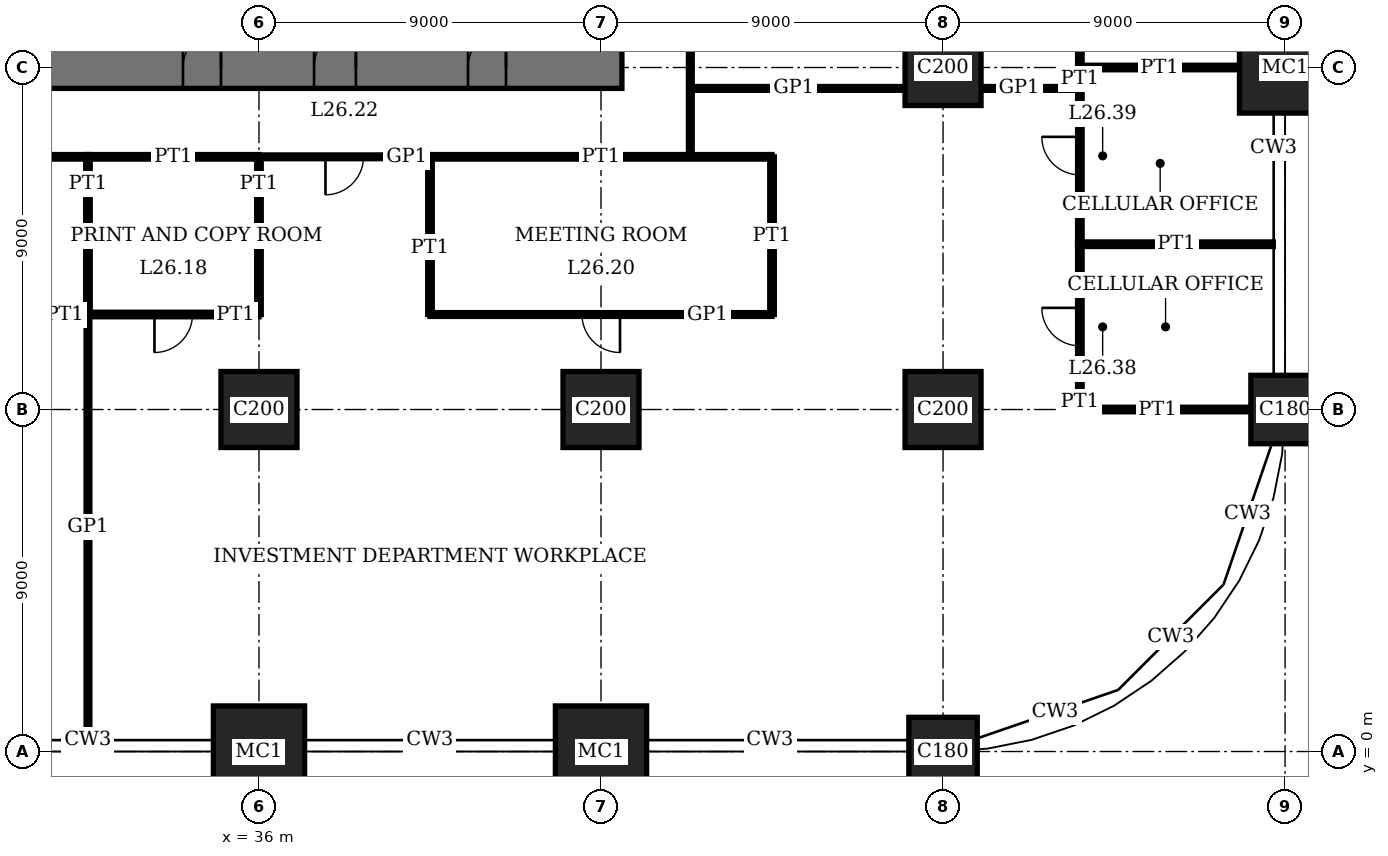
"""IFC4 building model, lengths in metres.
Left out: names, types, materials, properties, quantities, classifications, styles, units other than length and angle.
Written with IfcOpenShell. Run it as: python <this file> out.ifc"""

import sys

from ifc_helpers import new_model, si_unit, direction, frame, frame_2d, origin, origin_2d, place, context, subcontext, project, spatial, rectangle, extrude, element, fill, save


model = new_model("IFC4")
c1 = context("Model", 3, precision=1e-05, world=origin(), true_north=direction((0.0, 1.0)))
c2 = subcontext(c1, "Body", "Model", "MODEL_VIEW")
j1 = project(units=[si_unit("LENGTHUNIT", "METRE"), si_unit("PLANEANGLEUNIT", "RADIAN")], contexts=[c1])
p1 = place(None, origin())
s1 = spatial("IfcSite", under=j1, at=p1, CompositionType="ELEMENT")
p2 = place(p1, origin())
s2 = spatial("IfcBuilding", under=s1, at=p2, CompositionType="ELEMENT")
p3 = place(p2, frame((0.0, 0.0, 109.0)))
s3 = spatial("IfcBuildingStorey", under=s2, at=p3, CompositionType="ELEMENT", Elevation=109.0)
p4 = place(p3, frame((36.0, 0.0, 0.0), z_axis=(0.0, 0.0, 1.0), x_axis=(1.0, 0.0, 0.0)))
e1 = element("IfcColumn", 1, at=p4, inside=s3, PredefinedType="COLUMN", context=c2, shape_type="SweptSolid", body=[
    extrude(rectangle(XDim=2.4, YDim=2.4, at=origin_2d()), origin(), (0.0, 0.0, 1.0), 4.0),
])
p5 = place(p3, frame((36.0, 9.0, 0.0), z_axis=(0.0, 0.0, 1.0), x_axis=(1.0, 0.0, 0.0)))
e2 = element("IfcColumn", 2, at=p5, inside=s3, PredefinedType="COLUMN", context=c2, shape_type="SweptSolid", body=[
    extrude(rectangle(XDim=2.0, YDim=2.0, at=origin_2d()), origin(), (0.0, 0.0, 1.0), 4.0),
])
p6 = place(p3, frame((45.0, 0.0, 0.0), z_axis=(0.0, 0.0, 1.0), x_axis=(1.0, 0.0, 0.0)))
e3 = element("IfcColumn", 3, at=p6, inside=s3, PredefinedType="COLUMN", context=c2, shape_type="SweptSolid", body=[
    extrude(rectangle(XDim=2.4, YDim=2.4, at=origin_2d()), origin(), (0.0, 0.0, 1.0), 4.0),
])
p7 = place(p3, frame((45.0, 9.0, 0.0), z_axis=(0.0, 0.0, 1.0), x_axis=(1.0, 0.0, 0.0)))
e4 = element("IfcColumn", 4, at=p7, inside=s3, PredefinedType="COLUMN", context=c2, shape_type="SweptSolid", body=[
    extrude(rectangle(XDim=2.0, YDim=2.0, at=origin_2d()), origin(), (0.0, 0.0, 1.0), 4.0),
])
p8 = place(p3, frame((54.0, 0.0, 0.0), z_axis=(0.0, 0.0, 1.0), x_axis=(1.0, 0.0, 0.0)))
e5 = element("IfcColumn", 5, at=p8, inside=s3, PredefinedType="COLUMN", context=c2, shape_type="SweptSolid", body=[
    extrude(rectangle(XDim=1.8, YDim=1.8, at=origin_2d()), origin(), (0.0, 0.0, 1.0), 4.0),
])
for number, where, z_axis, x_axis in (
    (6, (54.0, 9.0, 0.0), (0.0, 0.0, 1.0), (1.0, 0.0, 0.0)),
    (7, (54.0, 18.0, 0.0), (0.0, 0.0, 1.0), (1.0, 0.0, 0.0)),
):
    element("IfcColumn", number, at=place(p3, frame(where, z_axis=z_axis, x_axis=x_axis)), inside=s3, PredefinedType="COLUMN", context=c2, shape_type="SweptSolid", body=[
        extrude(rectangle(XDim=2.0, YDim=2.0, at=origin_2d()), origin(), (0.0, 0.0, 1.0), 4.0),
    ])
p9 = place(p3, frame((63.0, 9.0, 0.0), z_axis=(0.0, 0.0, 1.0), x_axis=(1.0, 0.0, 0.0)))
e8 = element("IfcColumn", 8, at=p9, inside=s3, PredefinedType="COLUMN", context=c2, shape_type="SweptSolid", body=[
    extrude(rectangle(XDim=1.8, YDim=1.8, at=origin_2d()), origin(), (0.0, 0.0, 1.0), 4.0),
])
p10 = place(p3, frame((63.0, 18.0, 0.0), z_axis=(0.0, 0.0, 1.0), x_axis=(1.0, 0.0, 0.0)))
e9 = element("IfcColumn", 9, at=p10, inside=s3, PredefinedType="COLUMN", context=c2, shape_type="SweptSolid", body=[
    extrude(rectangle(XDim=2.4, YDim=2.4, at=origin_2d()), origin(), (0.0, 0.0, 1.0), 4.0),
])
p11 = place(p3, frame((17.45, 18.0, 0.0), z_axis=(0.0, 0.0, 1.0), x_axis=(1.0, 0.0, 0.0)))
e10 = element("IfcWall", 10, at=p11, inside=s3, PredefinedType="SHEAR", context=c2, shape_type="SweptSolid", body=[
    extrude(rectangle(XDim=28.1, YDim=1.1, at=frame_2d((14.05, 0.0))), origin(), (0.0, 0.0, 1.0), 4.0),
])
p12 = place(p11, frame((11.55, 0.0, 0.0)))
e11 = element("IfcOpeningElement", 11, at=p12, cuts=e10, PredefinedType="OPENING", context=c2, shape_type="SweptSolid", body=[
    extrude(rectangle(XDim=1.0, YDim=2.4, at=frame_2d((0.5, 1.2))), frame((0.0, 0.56, 0.0), z_axis=(0.0, -1.0, 0.0), x_axis=(1.0, 0.0, 0.0)), (0.0, 0.0, 1.0), 1.12),
])
p13 = place(p11, frame((16.55, 0.0, 0.0)))
e12 = element("IfcOpeningElement", 12, at=p13, cuts=e10, PredefinedType="OPENING", context=c2, shape_type="SweptSolid", body=[
    extrude(rectangle(XDim=1.0, YDim=2.4, at=frame_2d((0.5, 1.2))), frame((0.0, 0.56, 0.0), z_axis=(0.0, -1.0, 0.0), x_axis=(1.0, 0.0, 0.0)), (0.0, 0.0, 1.0), 1.12),
])
p14 = place(p11, frame((20.0, 0.0, 0.0)))
e13 = element("IfcOpeningElement", 13, at=p14, cuts=e10, PredefinedType="OPENING", context=c2, shape_type="SweptSolid", body=[
    extrude(rectangle(XDim=1.1, YDim=2.4, at=frame_2d((0.55, 1.2))), frame((0.0, 0.56, 0.0), z_axis=(0.0, -1.0, 0.0), x_axis=(1.0, 0.0, 0.0)), (0.0, 0.0, 1.0), 1.12),
])
p15 = place(p11, frame((24.05, 0.0, 0.0)))
e14 = element("IfcOpeningElement", 14, at=p15, cuts=e10, PredefinedType="OPENING", context=c2, shape_type="SweptSolid", body=[
    extrude(rectangle(XDim=1.0, YDim=2.4, at=frame_2d((0.5, 1.2))), frame((0.0, 0.56, 0.0), z_axis=(0.0, -1.0, 0.0), x_axis=(1.0, 0.0, 0.0)), (0.0, 0.0, 1.0), 1.12),
])
p16 = place(p3, frame((57.6, 9.0, 0.0), z_axis=(0.0, 0.0, 1.0), x_axis=(1.0, 0.0, 0.0)))
e15 = element("IfcWall", 15, at=p16, inside=s3, PredefinedType="PARTITIONING", context=c2, shape_type="SweptSolid", body=[
    extrude(rectangle(XDim=4.5, YDim=0.12, at=frame_2d((2.25, 0.0))), origin(), (0.0, 0.0, 1.0), 3.05),
])
p17 = place(p3, frame((27.0, 11.5, 0.0), z_axis=(0.0, 0.0, 1.0), x_axis=(1.0, 0.0, 0.0)))
e16 = element("IfcWall", 16, at=p17, inside=s3, PredefinedType="PARTITIONING", context=c2, shape_type="SweptSolid", body=[
    extrude(rectangle(XDim=4.5, YDim=0.12, at=frame_2d((2.25, 0.0))), origin(), (0.0, 0.0, 1.0), 3.75),
])
p18 = place(p17, frame((1.75, 0.0, 0.0)))
e17 = element("IfcOpeningElement", 17, at=p18, cuts=e16, PredefinedType="OPENING", context=c2, shape_type="SweptSolid", body=[
    extrude(rectangle(XDim=1.0, YDim=2.4, at=frame_2d((0.5, 1.2))), frame((0.0, 0.07, 0.0), z_axis=(0.0, -1.0, 0.0), x_axis=(1.0, 0.0, 0.0)), (0.0, 0.0, 1.0), 0.14),
])
p19 = place(p3, frame((31.5, 11.5, 0.0), z_axis=(0.0, 0.0, 1.0), x_axis=(1.0, 0.0, 0.0)))
e18 = element("IfcWall", 18, at=p19, inside=s3, PredefinedType="PARTITIONING", context=c2, shape_type="SweptSolid", body=[
    extrude(rectangle(XDim=4.5, YDim=0.12, at=frame_2d((2.25, 0.0))), origin(), (0.0, 0.0, 1.0), 3.75),
])
p20 = place(p19, frame((1.75, 0.0, 0.0)))
e19 = element("IfcOpeningElement", 19, at=p20, cuts=e18, PredefinedType="OPENING", context=c2, shape_type="SweptSolid", body=[
    extrude(rectangle(XDim=1.0, YDim=2.4, at=frame_2d((0.5, 1.2))), frame((0.0, 0.07, 0.0), z_axis=(0.0, -1.0, 0.0), x_axis=(1.0, 0.0, 0.0)), (0.0, 0.0, 1.0), 0.14),
])
p21 = place(p3, frame((40.5, 11.5, 0.0), z_axis=(0.0, 0.0, 1.0), x_axis=(1.0, 0.0, 0.0)))
e20 = element("IfcWall", 20, at=p21, inside=s3, PredefinedType="PARTITIONING", context=c2, shape_type="SweptSolid", body=[
    extrude(rectangle(XDim=9.0, YDim=0.1, at=frame_2d((4.5, 0.0))), origin(), (0.0, 0.0, 1.0), 3.75),
])
p22 = place(p21, frame((4.0, 0.0, 0.0)))
e21 = element("IfcOpeningElement", 21, at=p22, cuts=e20, PredefinedType="OPENING", context=c2, shape_type="SweptSolid", body=[
    extrude(rectangle(XDim=1.0, YDim=2.4, at=frame_2d((0.5, 1.2))), frame((0.0, 0.06, 0.0), z_axis=(0.0, -1.0, 0.0), x_axis=(1.0, 0.0, 0.0)), (0.0, 0.0, 1.0), 0.12),
])
p23 = place(p3, frame((57.6, 13.35, 0.0), z_axis=(0.0, 0.0, 1.0), x_axis=(1.0, 0.0, 0.0)))
e22 = element("IfcWall", 22, at=p23, inside=s3, PredefinedType="PARTITIONING", context=c2, shape_type="SweptSolid", body=[
    extrude(rectangle(XDim=5.09, YDim=0.12, at=frame_2d((2.545, 0.0))), origin(), (0.0, 0.0, 1.0), 3.1),
])
p24 = place(p3, frame((40.5, 15.65, 0.0), z_axis=(0.0, 0.0, 1.0), x_axis=(1.0, 0.0, 0.0)))
e23 = element("IfcWall", 23, at=p24, inside=s3, PredefinedType="PARTITIONING", context=c2, shape_type="SweptSolid", body=[
    extrude(rectangle(XDim=9.0, YDim=0.12, at=frame_2d((4.5, 0.0))), origin(), (0.0, 0.0, 1.0), 3.75),
])
for number, where, z_axis, x_axis in (
    (24, (27.0, 15.65, 0.0), (0.0, 0.0, 1.0), (1.0, 0.0, 0.0)),
    (25, (31.5, 15.65, 0.0), (0.0, 0.0, 1.0), (1.0, 0.0, 0.0)),
):
    element("IfcWall", number, at=place(p3, frame(where, z_axis=z_axis, x_axis=x_axis)), inside=s3, PredefinedType="PARTITIONING", context=c2, shape_type="SweptSolid", body=[
        extrude(rectangle(XDim=4.5, YDim=0.12, at=frame_2d((2.25, 0.0))), origin(), (0.0, 0.0, 1.0), 3.75),
    ])
p25 = place(p3, frame((36.0, 15.65, 0.0), z_axis=(0.0, 0.0, 1.0), x_axis=(1.0, 0.0, 0.0)))
e26 = element("IfcWall", 26, at=p25, inside=s3, PredefinedType="PARTITIONING", context=c2, shape_type="SweptSolid", body=[
    extrude(rectangle(XDim=4.5, YDim=0.1, at=frame_2d((2.25, 0.0))), origin(), (0.0, 0.0, 1.0), 3.75),
])
p26 = place(p25, frame((1.75, 0.0, 0.0)))
e27 = element("IfcOpeningElement", 27, at=p26, cuts=e26, PredefinedType="OPENING", context=c2, shape_type="SweptSolid", body=[
    extrude(rectangle(XDim=1.0, YDim=2.4, at=frame_2d((0.5, 1.2))), frame((0.0, 0.06, 0.0), z_axis=(0.0, -1.0, 0.0), x_axis=(1.0, 0.0, 0.0)), (0.0, 0.0, 1.0), 0.12),
])
p27 = place(p3, frame((47.35, 17.45, 0.0), z_axis=(0.0, 0.0, 1.0), x_axis=(1.0, 0.0, 0.0)))
e28 = element("IfcWall", 28, at=p27, inside=s3, PredefinedType="PARTITIONING", context=c2, shape_type="SweptSolid", body=[
    extrude(rectangle(XDim=5.65, YDim=0.1, at=frame_2d((2.825, 0.0))), origin(), (0.0, 0.0, 1.0), 3.75),
])
p28 = place(p3, frame((55.0, 17.45, 0.0), z_axis=(0.0, 0.0, 1.0), x_axis=(1.0, 0.0, 0.0)))
e29 = element("IfcWall", 29, at=p28, inside=s3, PredefinedType="PARTITIONING", context=c2, shape_type="SweptSolid", body=[
    extrude(rectangle(XDim=2.61, YDim=0.1, at=frame_2d((1.305, 0.0))), origin(), (0.0, 0.0, 1.0), 3.75),
])
p29 = place(p3, frame((57.6, 18.0, 0.0), z_axis=(0.0, 0.0, 1.0), x_axis=(1.0, 0.0, 0.0)))
e30 = element("IfcWall", 30, at=p29, inside=s3, PredefinedType="PARTITIONING", context=c2, shape_type="SweptSolid", body=[
    extrude(rectangle(XDim=4.2, YDim=0.12, at=frame_2d((2.1, 0.0))), origin(), (0.0, 0.0, 1.0), 3.05),
])
p30 = place(p3, frame((31.5, 11.5, 0.0), z_axis=(0.0, 0.0, 1.0), x_axis=(0.0, 1.0, 0.0)))
e31 = element("IfcWall", 31, at=p30, inside=s3, PredefinedType="PARTITIONING", context=c2, shape_type="SweptSolid", body=[
    extrude(rectangle(XDim=4.15, YDim=0.12, at=frame_2d((2.075, 0.0))), origin(), (0.0, 0.0, 1.0), 3.75),
])
p31 = place(p3, frame((31.5, 0.31, 0.0), z_axis=(0.0, 0.0, 1.0), x_axis=(0.0, 1.0, 0.0)))
e32 = element("IfcWall", 32, at=p31, inside=s3, PredefinedType="PARTITIONING", context=c2, shape_type="SweptSolid", body=[
    extrude(rectangle(XDim=11.19, YDim=0.1, at=frame_2d((5.595, 0.0))), origin(), (0.0, 0.0, 1.0), 3.75),
])
p32 = place(p3, frame((36.0, 11.5, 0.0), z_axis=(0.0, 0.0, 1.0), x_axis=(0.0, 1.0, 0.0)))
e33 = element("IfcWall", 33, at=p32, inside=s3, PredefinedType="PARTITIONING", context=c2, shape_type="SweptSolid", body=[
    extrude(rectangle(XDim=4.15, YDim=0.12, at=frame_2d((2.075, 0.0))), origin(), (0.0, 0.0, 1.0), 3.05),
])
p33 = place(p3, frame((40.5, 11.5, 0.0), z_axis=(0.0, 0.0, 1.0), x_axis=(0.0, 1.0, 0.0)))
e34 = element("IfcWall", 34, at=p33, inside=s3, PredefinedType="PARTITIONING", context=c2, shape_type="SweptSolid", body=[
    extrude(rectangle(XDim=4.15, YDim=0.12, at=frame_2d((2.075, 0.0))), origin(), (0.0, 0.0, 1.0), 3.75),
])
p34 = place(p3, frame((47.35, 15.65, 0.0), z_axis=(0.0, 0.0, 1.0), x_axis=(0.0, 1.0, 0.0)))
e35 = element("IfcWall", 35, at=p34, inside=s3, PredefinedType="PARTITIONING", context=c2, shape_type="SweptSolid", body=[
    extrude(rectangle(XDim=20.9, YDim=0.1, at=frame_2d((10.45, 0.0))), origin(), (0.0, 0.0, 1.0), 3.75),
])
p35 = place(p34, frame((9.95, 0.0, 0.0)))
e36 = element("IfcOpeningElement", 36, at=p35, cuts=e35, PredefinedType="OPENING", context=c2, shape_type="SweptSolid", body=[
    extrude(rectangle(XDim=1.0, YDim=2.4, at=frame_2d((0.5, 1.2))), frame((0.0, 0.06, 0.0), z_axis=(0.0, -1.0, 0.0), x_axis=(1.0, 0.0, 0.0)), (0.0, 0.0, 1.0), 0.12),
])
p36 = place(p3, frame((49.5, 11.5, 0.0), z_axis=(0.0, 0.0, 1.0), x_axis=(0.0, 1.0, 0.0)))
e37 = element("IfcWall", 37, at=p36, inside=s3, PredefinedType="PARTITIONING", context=c2, shape_type="SweptSolid", body=[
    extrude(rectangle(XDim=4.15, YDim=0.12, at=frame_2d((2.075, 0.0))), origin(), (0.0, 0.0, 1.0), 3.75),
])
p37 = place(p3, frame((57.6, 9.0, 0.0), z_axis=(0.0, 0.0, 1.0), x_axis=(0.0, 1.0, 0.0)))
e38 = element("IfcWall", 38, at=p37, inside=s3, PredefinedType="PARTITIONING", context=c2, shape_type="SweptSolid", body=[
    extrude(rectangle(XDim=4.35, YDim=0.12, at=frame_2d((2.175, 0.0))), origin(), (0.0, 0.0, 1.0), 3.75),
])
p38 = place(p37, frame((1.675, 0.0, 0.0)))
e39 = element("IfcOpeningElement", 39, at=p38, cuts=e38, PredefinedType="OPENING", context=c2, shape_type="SweptSolid", body=[
    extrude(rectangle(XDim=1.0, YDim=2.4, at=frame_2d((0.5, 1.2))), frame((0.0, 0.07, 0.0), z_axis=(0.0, -1.0, 0.0), x_axis=(1.0, 0.0, 0.0)), (0.0, 0.0, 1.0), 0.14),
])
p39 = place(p3, frame((57.6, 13.35, 0.0), z_axis=(0.0, 0.0, 1.0), x_axis=(0.0, 1.0, 0.0)))
e40 = element("IfcWall", 40, at=p39, inside=s3, PredefinedType="PARTITIONING", context=c2, shape_type="SweptSolid", body=[
    extrude(rectangle(XDim=4.65, YDim=0.12, at=frame_2d((2.325, 0.0))), origin(), (0.0, 0.0, 1.0), 3.75),
])
p40 = place(p39, frame((1.825, 0.0, 0.0)))
e41 = element("IfcOpeningElement", 41, at=p40, cuts=e40, PredefinedType="OPENING", context=c2, shape_type="SweptSolid", body=[
    extrude(rectangle(XDim=1.0, YDim=2.4, at=frame_2d((0.5, 1.2))), frame((0.0, 0.07, 0.0), z_axis=(0.0, -1.0, 0.0), x_axis=(1.0, 0.0, 0.0)), (0.0, 0.0, 1.0), 0.14),
])
p41 = place(p3, frame((57.6, 18.0, 0.0), z_axis=(0.0, 0.0, 1.0), x_axis=(0.0, 1.0, 0.0)))
e42 = element("IfcWall", 42, at=p41, inside=s3, PredefinedType="PARTITIONING", context=c2, shape_type="SweptSolid", body=[
    extrude(rectangle(XDim=4.5, YDim=0.12, at=frame_2d((2.25, 0.0))), origin(), (0.0, 0.0, 1.0), 3.75),
])
p42 = place(p41, frame((1.75, 0.0, 0.0)))
e43 = element("IfcOpeningElement", 43, at=p42, cuts=e42, PredefinedType="OPENING", context=c2, shape_type="SweptSolid", body=[
    extrude(rectangle(XDim=1.0, YDim=2.4, at=frame_2d((0.5, 1.2))), frame((0.0, 0.07, 0.0), z_axis=(0.0, -1.0, 0.0), x_axis=(1.0, 0.0, 0.0)), (0.0, 0.0, 1.0), 0.14),
])
p43 = place(p13, origin())
e44 = element("IfcDoor", 44, at=p43, inside=s3, OperationType="SINGLE_SWING_LEFT", PredefinedType="DOOR", context=c2, shape_type="SweptSolid", body=[
    extrude(rectangle(XDim=1.0, YDim=2.4, at=frame_2d((0.5, 1.2))), frame((0.0, 0.025, 0.0), z_axis=(0.0, -1.0, 0.0), x_axis=(1.0, 0.0, 0.0)), (0.0, 0.0, 1.0), 0.05),
    extrude(rectangle(XDim=0.04, YDim=2.4, at=frame_2d((0.02, 1.2))), frame((0.0, 0.4, 0.0), z_axis=(0.0, -1.0, 0.0), x_axis=(1.0, 0.0, 0.0)), (0.0, 0.0, 1.0), 0.8),
    extrude(rectangle(XDim=0.04, YDim=2.4, at=frame_2d((0.98, 1.2))), frame((0.0, 0.4, 0.0), z_axis=(0.0, -1.0, 0.0), x_axis=(1.0, 0.0, 0.0)), (0.0, 0.0, 1.0), 0.8),
    extrude(rectangle(XDim=1.0, YDim=0.04, at=frame_2d((0.5, 2.38))), frame((0.0, 0.4, 0.0), z_axis=(0.0, -1.0, 0.0), x_axis=(1.0, 0.0, 0.0)), (0.0, 0.0, 1.0), 0.8),
])
fill(e12, e44)
p44 = place(p14, origin())
e45 = element("IfcDoor", 45, at=p44, inside=s3, OperationType="SINGLE_SWING_LEFT", PredefinedType="DOOR", context=c2, shape_type="SweptSolid", body=[
    extrude(rectangle(XDim=1.1, YDim=2.4, at=frame_2d((0.55, 1.2))), frame((0.0, 0.025, 0.0), z_axis=(0.0, -1.0, 0.0), x_axis=(1.0, 0.0, 0.0)), (0.0, 0.0, 1.0), 0.05),
    extrude(rectangle(XDim=0.04, YDim=2.4, at=frame_2d((0.02, 1.2))), frame((0.0, 0.44, 0.0), z_axis=(0.0, -1.0, 0.0), x_axis=(1.0, 0.0, 0.0)), (0.0, 0.0, 1.0), 0.88),
    extrude(rectangle(XDim=0.04, YDim=2.4, at=frame_2d((1.08, 1.2))), frame((0.0, 0.44, 0.0), z_axis=(0.0, -1.0, 0.0), x_axis=(1.0, 0.0, 0.0)), (0.0, 0.0, 1.0), 0.88),
    extrude(rectangle(XDim=1.1, YDim=0.04, at=frame_2d((0.55, 2.38))), frame((0.0, 0.44, 0.0), z_axis=(0.0, -1.0, 0.0), x_axis=(1.0, 0.0, 0.0)), (0.0, 0.0, 1.0), 0.88),
])
fill(e13, e45)
p45 = place(p15, origin())
e46 = element("IfcDoor", 46, at=p45, inside=s3, OperationType="SINGLE_SWING_LEFT", PredefinedType="DOOR", context=c2, shape_type="SweptSolid", body=[
    extrude(rectangle(XDim=1.0, YDim=2.4, at=frame_2d((0.5, 1.2))), frame((0.0, 0.025, 0.0), z_axis=(0.0, -1.0, 0.0), x_axis=(1.0, 0.0, 0.0)), (0.0, 0.0, 1.0), 0.05),
    extrude(rectangle(XDim=0.04, YDim=2.4, at=frame_2d((0.02, 1.2))), frame((0.0, 0.4, 0.0), z_axis=(0.0, -1.0, 0.0), x_axis=(1.0, 0.0, 0.0)), (0.0, 0.0, 1.0), 0.8),
    extrude(rectangle(XDim=0.04, YDim=2.4, at=frame_2d((0.98, 1.2))), frame((0.0, 0.4, 0.0), z_axis=(0.0, -1.0, 0.0), x_axis=(1.0, 0.0, 0.0)), (0.0, 0.0, 1.0), 0.8),
    extrude(rectangle(XDim=1.0, YDim=0.04, at=frame_2d((0.5, 2.38))), frame((0.0, 0.4, 0.0), z_axis=(0.0, -1.0, 0.0), x_axis=(1.0, 0.0, 0.0)), (0.0, 0.0, 1.0), 0.8),
])
fill(e14, e46)
p46 = place(p20, origin())
e47 = element("IfcDoor", 47, at=p46, inside=s3, OperationType="SINGLE_SWING_LEFT", PredefinedType="DOOR", context=c2, shape_type="SweptSolid", body=[
    extrude(rectangle(XDim=1.0, YDim=2.4, at=frame_2d((0.5, 1.2))), frame((0.0, 0.025, 0.0), z_axis=(0.0, -1.0, 0.0), x_axis=(1.0, 0.0, 0.0)), (0.0, 0.0, 1.0), 0.05),
])
fill(e19, e47)
p47 = place(p22, origin())
e48 = element("IfcDoor", 48, at=p47, inside=s3, OperationType="SINGLE_SWING_RIGHT", PredefinedType="DOOR", context=c2, shape_type="SweptSolid", body=[
    extrude(rectangle(XDim=1.0, YDim=2.4, at=frame_2d((0.5, 1.2))), frame((0.0, 0.02, 0.0), z_axis=(0.0, -1.0, 0.0), x_axis=(1.0, 0.0, 0.0)), (0.0, 0.0, 1.0), 0.04),
])
fill(e21, e48)
p48 = place(p26, origin())
e49 = element("IfcDoor", 49, at=p48, inside=s3, OperationType="SINGLE_SWING_LEFT", PredefinedType="DOOR", context=c2, shape_type="SweptSolid", body=[
    extrude(rectangle(XDim=1.0, YDim=2.4, at=frame_2d((0.5, 1.2))), frame((0.0, 0.02, 0.0), z_axis=(0.0, -1.0, 0.0), x_axis=(1.0, 0.0, 0.0)), (0.0, 0.0, 1.0), 0.04),
])
fill(e27, e49)
p49 = place(p38, origin())
e50 = element("IfcDoor", 50, at=p49, inside=s3, OperationType="SINGLE_SWING_LEFT", PredefinedType="DOOR", context=c2, shape_type="SweptSolid", body=[
    extrude(rectangle(XDim=1.0, YDim=2.4, at=frame_2d((0.5, 1.2))), frame((0.0, 0.025, 0.0), z_axis=(0.0, -1.0, 0.0), x_axis=(1.0, 0.0, 0.0)), (0.0, 0.0, 1.0), 0.05),
])
fill(e39, e50)
p50 = place(p40, origin())
e51 = element("IfcDoor", 51, at=p50, inside=s3, OperationType="SINGLE_SWING_LEFT", PredefinedType="DOOR", context=c2, shape_type="SweptSolid", body=[
    extrude(rectangle(XDim=1.0, YDim=2.4, at=frame_2d((0.5, 1.2))), frame((0.0, 0.025, 0.0), z_axis=(0.0, -1.0, 0.0), x_axis=(1.0, 0.0, 0.0)), (0.0, 0.0, 1.0), 0.05),
])
fill(e41, e51)
save(model, sys.argv[1])
